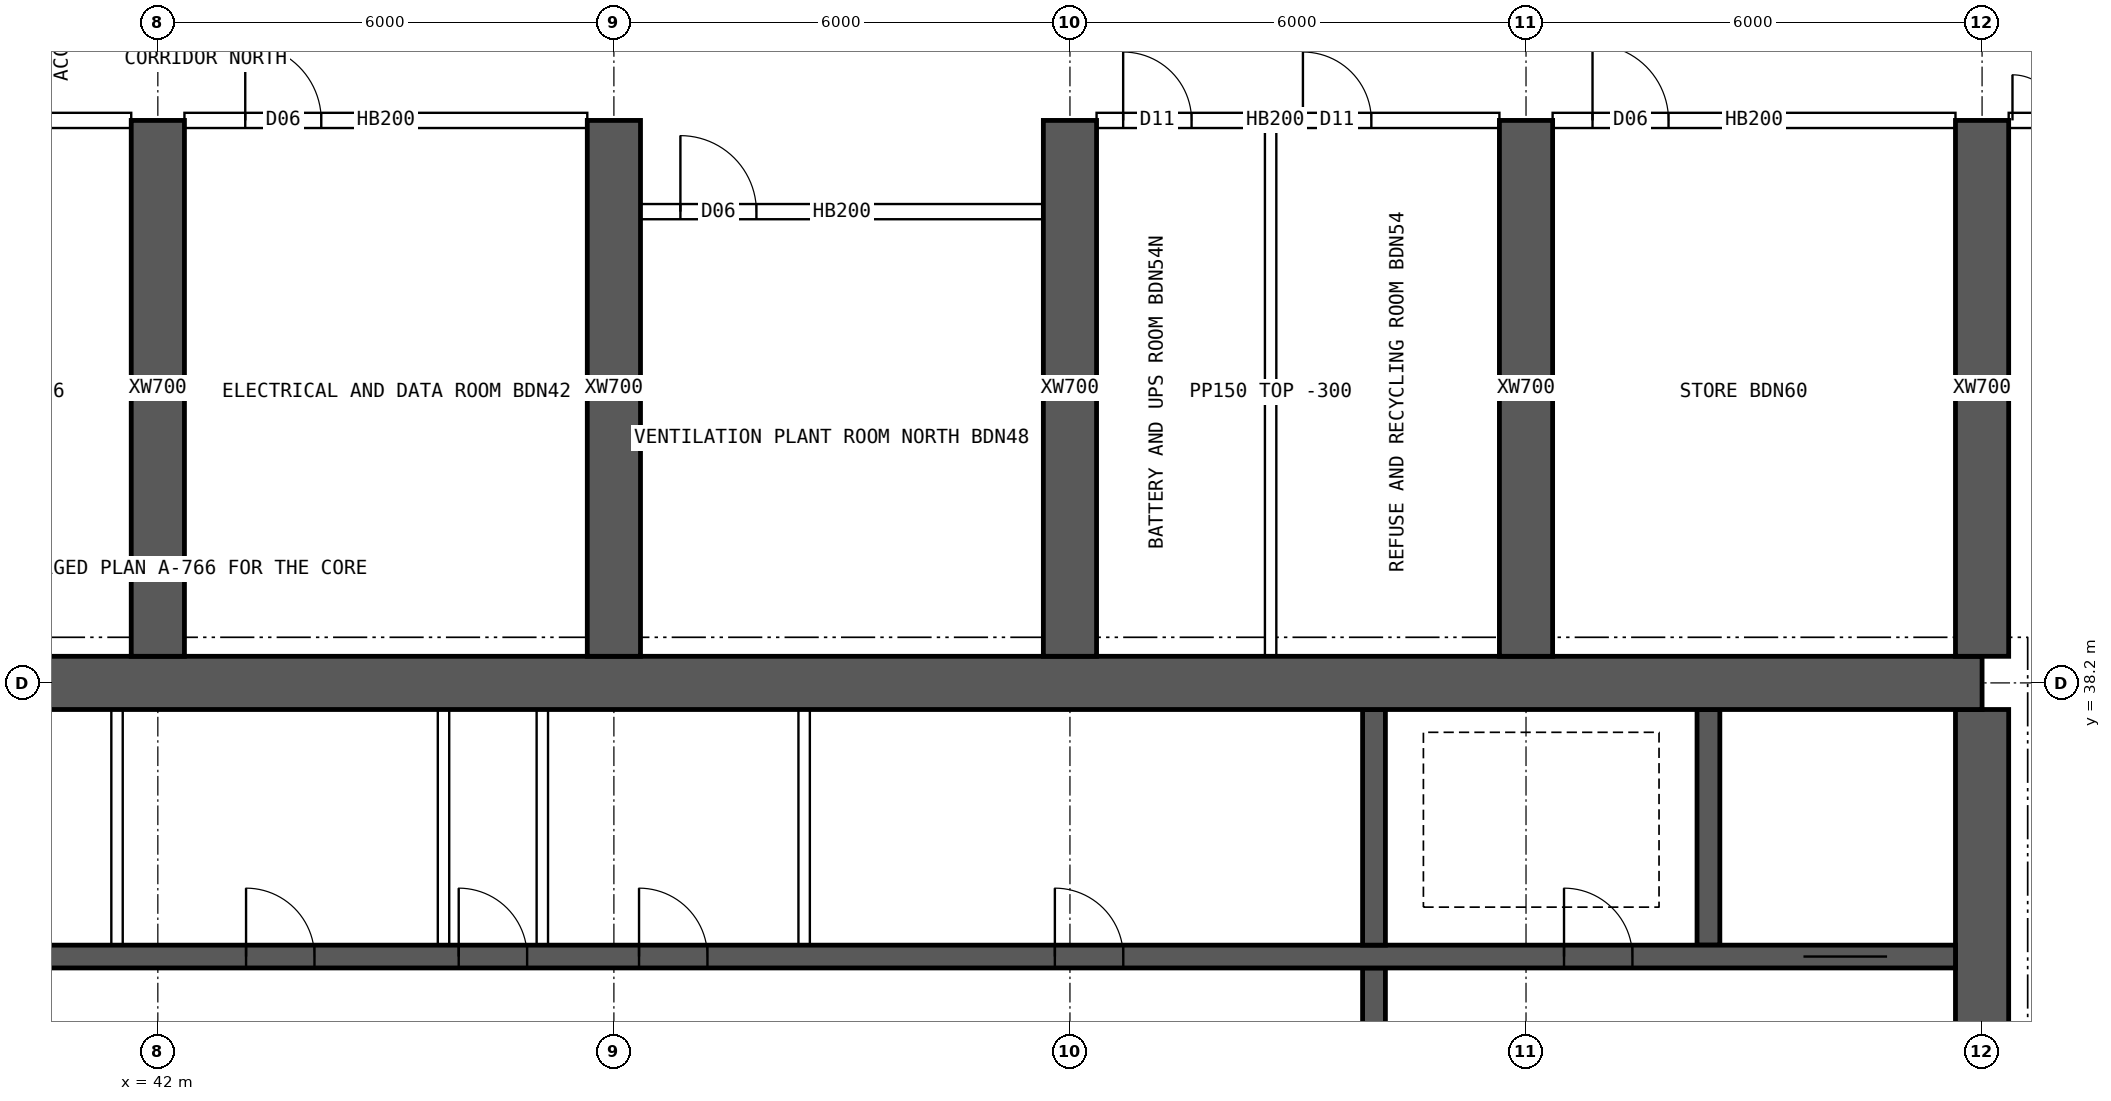
"""IFC4 building model, lengths in metres.
Left out: names, types, materials, properties, quantities, classifications, styles, units other than length and angle.
Written with IfcOpenShell. Run it as: python <this file> out.ifc"""

import sys

from ifc_helpers import new_model, si_unit, direction, frame, frame_2d, origin, place, context, subcontext, project, spatial, rectangle, extrude, element, fill, save


model = new_model("IFC4")
c1 = context("Model", 3, precision=1e-05, world=origin(), true_north=direction((0.0, 1.0)))
c2 = subcontext(c1, "Body", "Model", "MODEL_VIEW")
j1 = project(units=[si_unit("LENGTHUNIT", "METRE"), si_unit("PLANEANGLEUNIT", "RADIAN")], contexts=[c1])
p1 = place(None, origin())
s1 = spatial("IfcSite", under=j1, at=p1, CompositionType="ELEMENT")
p2 = place(p1, origin())
s2 = spatial("IfcBuilding", under=s1, at=p2, CompositionType="ELEMENT")
p3 = place(p2, frame((0.0, 0.0, 254.05)))
s3 = spatial("IfcBuildingStorey", under=s2, at=p3, CompositionType="ELEMENT", Elevation=254.05)
p4 = place(p3, frame((18.0, 38.2, 0.0), z_axis=(0.0, 0.0, 1.0), x_axis=(1.0, 0.0, 0.0)))
e1 = element("IfcWall", 1, at=p4, inside=s3, PredefinedType="SHEAR", context=c2, shape_type="SweptSolid", body=[
    extrude(rectangle(XDim=48.0, YDim=0.7, at=frame_2d((24.0, 0.0))), origin(), (0.0, 0.0, 1.0), 3.75),
])
p5 = place(p3, frame((66.0, 26.15, 0.0), z_axis=(0.0, 0.0, 1.0), x_axis=(0.0, 1.0, 0.0)))
e2 = element("IfcWall", 2, at=p5, inside=s3, PredefinedType="SHEAR", context=c2, shape_type="SweptSolid", body=[
    extrude(rectangle(XDim=11.7, YDim=0.7, at=frame_2d((5.85, 0.0))), origin(), (0.0, 0.0, 1.0), 3.75),
])
p6 = place(p5, frame((5.15, 0.0, 0.0)))
e3 = element("IfcOpeningElement", 3, at=p6, cuts=e2, PredefinedType="OPENING", context=c2, shape_type="SweptSolid", body=[
    extrude(rectangle(XDim=1.2, YDim=2.1, at=frame_2d((0.6, 1.05))), frame((0.0, 0.36, 0.0), z_axis=(0.0, -1.0, 0.0), x_axis=(1.0, 0.0, 0.0)), (0.0, 0.0, 1.0), 0.72),
])
p7 = place(p3, frame((18.35, 34.6, 0.0), z_axis=(0.0, 0.0, 1.0), x_axis=(1.0, 0.0, 0.0)))
e4 = element("IfcWall", 4, at=p7, inside=s3, PredefinedType="SHEAR", context=c2, shape_type="SweptSolid", body=[
    extrude(rectangle(XDim=47.3, YDim=0.3, at=frame_2d((23.65, 0.0))), origin(), (0.0, 0.0, 1.0), 3.75),
])
p8 = place(p7, frame((0.9, 0.0, 0.0)))
e5 = element("IfcOpeningElement", 5, at=p8, cuts=e4, PredefinedType="OPENING", context=c2, shape_type="SweptSolid", body=[
    extrude(rectangle(XDim=1.1, YDim=2.1, at=frame_2d((0.55, 1.05))), frame((0.0, 0.16, 0.0), z_axis=(0.0, -1.0, 0.0), x_axis=(1.0, 0.0, 0.0)), (0.0, 0.0, 1.0), 0.32),
])
p9 = place(p7, frame((45.3, 0.0, 0.0)))
e6 = element("IfcOpeningElement", 6, at=p9, cuts=e4, PredefinedType="OPENING", context=c2, shape_type="SweptSolid", body=[
    extrude(rectangle(XDim=1.1, YDim=2.1, at=frame_2d((0.55, 1.05))), frame((0.0, 0.16, 0.0), z_axis=(0.0, -1.0, 0.0), x_axis=(1.0, 0.0, 0.0)), (0.0, 0.0, 1.0), 0.32),
])
p10 = place(p7, frame((4.25, 0.0, 0.0)))
e7 = element("IfcOpeningElement", 7, at=p10, cuts=e4, PredefinedType="OPENING", context=c2, shape_type="SweptSolid", body=[
    extrude(rectangle(XDim=0.9, YDim=2.1, at=frame_2d((0.45, 1.05))), frame((0.0, 0.16, 0.0), z_axis=(0.0, -1.0, 0.0), x_axis=(1.0, 0.0, 0.0)), (0.0, 0.0, 1.0), 0.32),
])
p11 = place(p7, frame((42.15, 0.0, 0.0)))
e8 = element("IfcOpeningElement", 8, at=p11, cuts=e4, PredefinedType="OPENING", context=c2, shape_type="SweptSolid", body=[
    extrude(rectangle(XDim=0.9, YDim=2.1, at=frame_2d((0.45, 1.05))), frame((0.0, 0.16, 0.0), z_axis=(0.0, -1.0, 0.0), x_axis=(1.0, 0.0, 0.0)), (0.0, 0.0, 1.0), 0.32),
])
p12 = place(p7, frame((9.025, 0.0, 0.0)))
e9 = element("IfcOpeningElement", 9, at=p12, cuts=e4, PredefinedType="OPENING", context=c2, shape_type="SweptSolid", body=[
    extrude(rectangle(XDim=0.9, YDim=2.1, at=frame_2d((0.45, 1.05))), frame((0.0, 0.16, 0.0), z_axis=(0.0, -1.0, 0.0), x_axis=(1.0, 0.0, 0.0)), (0.0, 0.0, 1.0), 0.32),
])
p13 = place(p7, frame((12.999, 0.0, 0.0)))
e10 = element("IfcOpeningElement", 10, at=p13, cuts=e4, PredefinedType="OPENING", context=c2, shape_type="SweptSolid", body=[
    extrude(rectangle(XDim=0.9, YDim=2.1, at=frame_2d((0.45, 1.05))), frame((0.0, 0.16, 0.0), z_axis=(0.0, -1.0, 0.0), x_axis=(1.0, 0.0, 0.0)), (0.0, 0.0, 1.0), 0.32),
])
p14 = place(p7, frame((16.646, 0.0, 0.0)))
e11 = element("IfcOpeningElement", 11, at=p14, cuts=e4, PredefinedType="OPENING", context=c2, shape_type="SweptSolid", body=[
    extrude(rectangle(XDim=0.9, YDim=2.1, at=frame_2d((0.45, 1.05))), frame((0.0, 0.16, 0.0), z_axis=(0.0, -1.0, 0.0), x_axis=(1.0, 0.0, 0.0)), (0.0, 0.0, 1.0), 0.32),
])
p15 = place(p7, frame((20.405, 0.0, 0.0)))
e12 = element("IfcOpeningElement", 12, at=p15, cuts=e4, PredefinedType="OPENING", context=c2, shape_type="SweptSolid", body=[
    extrude(rectangle(XDim=0.9, YDim=2.1, at=frame_2d((0.45, 1.05))), frame((0.0, 0.16, 0.0), z_axis=(0.0, -1.0, 0.0), x_axis=(1.0, 0.0, 0.0)), (0.0, 0.0, 1.0), 0.32),
])
p16 = place(p7, frame((24.811, 0.0, 0.0)))
e13 = element("IfcOpeningElement", 13, at=p16, cuts=e4, PredefinedType="OPENING", context=c2, shape_type="SweptSolid", body=[
    extrude(rectangle(XDim=0.9, YDim=2.1, at=frame_2d((0.45, 1.05))), frame((0.0, 0.16, 0.0), z_axis=(0.0, -1.0, 0.0), x_axis=(1.0, 0.0, 0.0)), (0.0, 0.0, 1.0), 0.32),
])
p17 = place(p7, frame((27.608, 0.0, 0.0)))
e14 = element("IfcOpeningElement", 14, at=p17, cuts=e4, PredefinedType="OPENING", context=c2, shape_type="SweptSolid", body=[
    extrude(rectangle(XDim=0.9, YDim=2.1, at=frame_2d((0.45, 1.05))), frame((0.0, 0.16, 0.0), z_axis=(0.0, -1.0, 0.0), x_axis=(1.0, 0.0, 0.0)), (0.0, 0.0, 1.0), 0.32),
])
p18 = place(p7, frame((29.981, 0.0, 0.0)))
e15 = element("IfcOpeningElement", 15, at=p18, cuts=e4, PredefinedType="OPENING", context=c2, shape_type="SweptSolid", body=[
    extrude(rectangle(XDim=0.9, YDim=2.1, at=frame_2d((0.45, 1.05))), frame((0.0, 0.16, 0.0), z_axis=(0.0, -1.0, 0.0), x_axis=(1.0, 0.0, 0.0)), (0.0, 0.0, 1.0), 0.32),
])
p19 = place(p7, frame((35.451, 0.0, 0.0)))
e16 = element("IfcOpeningElement", 16, at=p19, cuts=e4, PredefinedType="OPENING", context=c2, shape_type="SweptSolid", body=[
    extrude(rectangle(XDim=0.9, YDim=2.1, at=frame_2d((0.45, 1.05))), frame((0.0, 0.16, 0.0), z_axis=(0.0, -1.0, 0.0), x_axis=(1.0, 0.0, 0.0)), (0.0, 0.0, 1.0), 0.32),
])
p20 = place(p3, frame((58.0, 30.55, 0.0), z_axis=(0.0, 0.0, 1.0), x_axis=(0.0, 1.0, 0.0)))
e17 = element("IfcWall", 17, at=p20, inside=s3, PredefinedType="SHEAR", context=c2, shape_type="SweptSolid", body=[
    extrude(rectangle(XDim=3.9, YDim=0.3, at=frame_2d((1.95, 0.0))), origin(), (0.0, 0.0, 1.0), 3.75),
])
p21 = place(p20, frame((1.4, 0.0, 0.0)))
e18 = element("IfcOpeningElement", 18, at=p21, cuts=e17, PredefinedType="OPENING", context=c2, shape_type="SweptSolid", body=[
    extrude(rectangle(XDim=1.2, YDim=2.1, at=frame_2d((0.6, 1.05))), frame((0.0, 0.16, 0.0), z_axis=(0.0, -1.0, 0.0), x_axis=(1.0, 0.0, 0.0)), (0.0, 0.0, 1.0), 0.32),
])
for number, where, z_axis, x_axis in (
    (19, (62.4, 34.75, 0.0), (0.0, 0.0, 1.0), (0.0, 1.0, 0.0)),
    (20, (58.0, 34.75, 0.0), (0.0, 0.0, 1.0), (0.0, 1.0, 0.0)),
):
    element("IfcWall", number, at=place(p3, frame(where, z_axis=z_axis, x_axis=x_axis)), inside=s3, PredefinedType="SHEAR", context=c2, shape_type="SweptSolid", body=[
        extrude(rectangle(XDim=3.1, YDim=0.3, at=frame_2d((1.55, 0.0))), origin(), (0.0, 0.0, 1.0), 3.75),
    ])
for number, where, z_axis, x_axis in (
    (21, (42.0, 38.55, 0.0), (0.0, 0.0, 1.0), (0.0, 1.0, 0.0)),
    (22, (48.0, 38.55, 0.0), (0.0, 0.0, 1.0), (0.0, 1.0, 0.0)),
    (23, (54.0, 38.55, 0.0), (0.0, 0.0, 1.0), (0.0, 1.0, 0.0)),
    (24, (60.0, 38.55, 0.0), (0.0, 0.0, 1.0), (0.0, 1.0, 0.0)),
    (25, (66.0, 38.55, 0.0), (0.0, 0.0, 1.0), (0.0, 1.0, 0.0)),
):
    element("IfcWall", number, at=place(p3, frame(where, z_axis=z_axis, x_axis=x_axis)), inside=s3, PredefinedType="SHEAR", context=c2, shape_type="SweptSolid", body=[
        extrude(rectangle(XDim=7.05, YDim=0.7, at=frame_2d((3.525, 0.0))), origin(), (0.0, 0.0, 1.0), 3.75),
    ])
for number, where, z_axis, x_axis in (
    (26, (41.463, 34.75, 0.0), (0.0, 0.0, 1.0), (0.0, 1.0, 0.0)),
    (27, (45.758, 34.75, 0.0), (0.0, 0.0, 1.0), (0.0, 1.0, 0.0)),
    (28, (47.058, 34.75, 0.0), (0.0, 0.0, 1.0), (0.0, 1.0, 0.0)),
    (29, (50.503, 34.75, 0.0), (0.0, 0.0, 1.0), (0.0, 1.0, 0.0)),
):
    element("IfcWall", number, at=place(p3, frame(where, z_axis=z_axis, x_axis=x_axis)), inside=s3, PredefinedType="SOLIDWALL", context=c2, shape_type="SweptSolid", body=[
        extrude(rectangle(XDim=3.1, YDim=0.15, at=frame_2d((1.55, 0.0))), origin(), (0.0, 0.0, 1.0), 3.45),
    ])
p22 = place(p3, frame((36.35, 45.6, 0.0), z_axis=(0.0, 0.0, 1.0), x_axis=(1.0, 0.0, 0.0)))
e30 = element("IfcWall", 30, at=p22, inside=s3, PredefinedType="SOLIDWALL", context=c2, shape_type="SweptSolid", body=[
    extrude(rectangle(XDim=5.3, YDim=0.2, at=frame_2d((2.65, 0.0))), origin(), (0.0, 0.0, 1.0), 3.45),
])
p23 = place(p22, frame((0.525, 0.0, 0.0)))
e31 = element("IfcOpeningElement", 31, at=p23, cuts=e30, PredefinedType="OPENING", context=c2, shape_type="SweptSolid", body=[
    extrude(rectangle(XDim=1.0, YDim=2.1, at=frame_2d((0.5, 1.05))), frame((0.0, 0.11, 0.0), z_axis=(0.0, -1.0, 0.0), x_axis=(1.0, 0.0, 0.0)), (0.0, 0.0, 1.0), 0.22),
])
p24 = place(p3, frame((42.35, 45.6, 0.0), z_axis=(0.0, 0.0, 1.0), x_axis=(1.0, 0.0, 0.0)))
e32 = element("IfcWall", 32, at=p24, inside=s3, PredefinedType="SOLIDWALL", context=c2, shape_type="SweptSolid", body=[
    extrude(rectangle(XDim=5.3, YDim=0.2, at=frame_2d((2.65, 0.0))), origin(), (0.0, 0.0, 1.0), 3.45),
])
p25 = place(p24, frame((0.8, 0.0, 0.0)))
e33 = element("IfcOpeningElement", 33, at=p25, cuts=e32, PredefinedType="OPENING", context=c2, shape_type="SweptSolid", body=[
    extrude(rectangle(XDim=1.0, YDim=2.1, at=frame_2d((0.5, 1.05))), frame((0.0, 0.11, 0.0), z_axis=(0.0, -1.0, 0.0), x_axis=(1.0, 0.0, 0.0)), (0.0, 0.0, 1.0), 0.22),
])
p26 = place(p3, frame((54.35, 45.6, 0.0), z_axis=(0.0, 0.0, 1.0), x_axis=(1.0, 0.0, 0.0)))
e34 = element("IfcWall", 34, at=p26, inside=s3, PredefinedType="SOLIDWALL", context=c2, shape_type="SweptSolid", body=[
    extrude(rectangle(XDim=5.3, YDim=0.2, at=frame_2d((2.65, 0.0))), origin(), (0.0, 0.0, 1.0), 3.45),
])
p27 = place(p26, frame((0.35, 0.0, 0.0)))
e35 = element("IfcOpeningElement", 35, at=p27, cuts=e34, PredefinedType="OPENING", context=c2, shape_type="SweptSolid", body=[
    extrude(rectangle(XDim=0.9, YDim=2.1, at=frame_2d((0.45, 1.05))), frame((0.0, 0.11, 0.0), z_axis=(0.0, -1.0, 0.0), x_axis=(1.0, 0.0, 0.0)), (0.0, 0.0, 1.0), 0.22),
])
p28 = place(p26, frame((2.715, 0.0, 0.0)))
e36 = element("IfcOpeningElement", 36, at=p28, cuts=e34, PredefinedType="OPENING", context=c2, shape_type="SweptSolid", body=[
    extrude(rectangle(XDim=0.9, YDim=2.1, at=frame_2d((0.45, 1.05))), frame((0.0, 0.11, 0.0), z_axis=(0.0, -1.0, 0.0), x_axis=(1.0, 0.0, 0.0)), (0.0, 0.0, 1.0), 0.22),
])
p29 = place(p3, frame((60.35, 45.6, 0.0), z_axis=(0.0, 0.0, 1.0), x_axis=(1.0, 0.0, 0.0)))
e37 = element("IfcWall", 37, at=p29, inside=s3, PredefinedType="SOLIDWALL", context=c2, shape_type="SweptSolid", body=[
    extrude(rectangle(XDim=5.3, YDim=0.2, at=frame_2d((2.65, 0.0))), origin(), (0.0, 0.0, 1.0), 3.45),
])
p30 = place(p29, frame((0.525, 0.0, 0.0)))
e38 = element("IfcOpeningElement", 38, at=p30, cuts=e37, PredefinedType="OPENING", context=c2, shape_type="SweptSolid", body=[
    extrude(rectangle(XDim=1.0, YDim=2.1, at=frame_2d((0.5, 1.05))), frame((0.0, 0.11, 0.0), z_axis=(0.0, -1.0, 0.0), x_axis=(1.0, 0.0, 0.0)), (0.0, 0.0, 1.0), 0.22),
])
p31 = place(p3, frame((66.35, 45.6, 0.0), z_axis=(0.0, 0.0, 1.0), x_axis=(1.0, 0.0, 0.0)))
e39 = element("IfcWall", 39, at=p31, inside=s3, PredefinedType="SOLIDWALL", context=c2, shape_type="SweptSolid", body=[
    extrude(rectangle(XDim=2.05, YDim=0.2, at=frame_2d((1.025, 0.0))), origin(), (0.0, 0.0, 1.0), 3.45),
])
p32 = place(p31, frame((0.05, 0.0, 0.0)))
e40 = element("IfcOpeningElement", 40, at=p32, cuts=e39, PredefinedType="OPENING", context=c2, shape_type="SweptSolid", body=[
    extrude(rectangle(XDim=1.2, YDim=2.1, at=frame_2d((0.6, 1.05))), frame((0.0, 0.11, 0.0), z_axis=(0.0, -1.0, 0.0), x_axis=(1.0, 0.0, 0.0)), (0.0, 0.0, 1.0), 0.22),
])
p33 = place(p3, frame((48.35, 44.4, 0.0), z_axis=(0.0, 0.0, 1.0), x_axis=(1.0, 0.0, 0.0)))
e41 = element("IfcWall", 41, at=p33, inside=s3, PredefinedType="SOLIDWALL", context=c2, shape_type="SweptSolid", body=[
    extrude(rectangle(XDim=5.3, YDim=0.2, at=frame_2d((2.65, 0.0))), origin(), (0.0, 0.0, 1.0), 3.45),
])
p34 = place(p33, frame((0.525, 0.0, 0.0)))
e42 = element("IfcOpeningElement", 42, at=p34, cuts=e41, PredefinedType="OPENING", context=c2, shape_type="SweptSolid", body=[
    extrude(rectangle(XDim=1.0, YDim=2.1, at=frame_2d((0.5, 1.05))), frame((0.0, 0.11, 0.0), z_axis=(0.0, -1.0, 0.0), x_axis=(1.0, 0.0, 0.0)), (0.0, 0.0, 1.0), 0.22),
])
p35 = place(p3, frame((56.64, 38.55, 0.0), z_axis=(0.0, 0.0, 1.0), x_axis=(0.0, 1.0, 0.0)))
e43 = element("IfcWall", 43, at=p35, inside=s3, PredefinedType="PARTITIONING", context=c2, shape_type="SweptSolid", body=[
    extrude(rectangle(XDim=6.95, YDim=0.15, at=frame_2d((3.475, 0.0))), origin(), (0.0, 0.0, 1.0), 3.45),
])
p36 = place(p9, origin())
e44 = element("IfcDoor", 44, at=p36, inside=s3, OperationType="DOUBLE_DOOR_SLIDING", PredefinedType="DOOR", context=c2, shape_type="SweptSolid", body=[
    extrude(rectangle(XDim=1.1, YDim=2.1, at=frame_2d((0.55, 1.05))), frame((0.0, 0.025, 0.0), z_axis=(0.0, -1.0, 0.0), x_axis=(1.0, 0.0, 0.0)), (0.0, 0.0, 1.0), 0.05),
])
fill(e6, e44)
p37 = place(p11, origin())
e45 = element("IfcDoor", 45, at=p37, inside=s3, OperationType="SINGLE_SWING_LEFT", PredefinedType="DOOR", context=c2, shape_type="SweptSolid", body=[
    extrude(rectangle(XDim=0.9, YDim=2.1, at=frame_2d((0.45, 1.05))), frame((0.0, 0.025, 0.0), z_axis=(0.0, -1.0, 0.0), x_axis=(1.0, 0.0, 0.0)), (0.0, 0.0, 1.0), 0.05),
])
fill(e8, e45)
p38 = place(p16, origin())
e46 = element("IfcDoor", 46, at=p38, inside=s3, OperationType="SINGLE_SWING_LEFT", PredefinedType="DOOR", context=c2, shape_type="SweptSolid", body=[
    extrude(rectangle(XDim=0.9, YDim=2.1, at=frame_2d((0.45, 1.05))), frame((0.0, 0.025, 0.0), z_axis=(0.0, -1.0, 0.0), x_axis=(1.0, 0.0, 0.0)), (0.0, 0.0, 1.0), 0.05),
])
fill(e13, e46)
p39 = place(p17, origin())
e47 = element("IfcDoor", 47, at=p39, inside=s3, OperationType="SINGLE_SWING_LEFT", PredefinedType="DOOR", context=c2, shape_type="SweptSolid", body=[
    extrude(rectangle(XDim=0.9, YDim=2.1, at=frame_2d((0.45, 1.05))), frame((0.0, 0.025, 0.0), z_axis=(0.0, -1.0, 0.0), x_axis=(1.0, 0.0, 0.0)), (0.0, 0.0, 1.0), 0.05),
])
fill(e14, e47)
p40 = place(p18, origin())
e48 = element("IfcDoor", 48, at=p40, inside=s3, OperationType="SINGLE_SWING_LEFT", PredefinedType="DOOR", context=c2, shape_type="SweptSolid", body=[
    extrude(rectangle(XDim=0.9, YDim=2.1, at=frame_2d((0.45, 1.05))), frame((0.0, 0.025, 0.0), z_axis=(0.0, -1.0, 0.0), x_axis=(1.0, 0.0, 0.0)), (0.0, 0.0, 1.0), 0.05),
])
fill(e15, e48)
p41 = place(p19, origin())
e49 = element("IfcDoor", 49, at=p41, inside=s3, OperationType="SINGLE_SWING_LEFT", PredefinedType="DOOR", context=c2, shape_type="SweptSolid", body=[
    extrude(rectangle(XDim=0.9, YDim=2.1, at=frame_2d((0.45, 1.05))), frame((0.0, 0.025, 0.0), z_axis=(0.0, -1.0, 0.0), x_axis=(1.0, 0.0, 0.0)), (0.0, 0.0, 1.0), 0.05),
])
fill(e16, e49)
p42 = place(p32, origin())
e50 = element("IfcDoor", 50, at=p42, inside=s3, OperationType="DOUBLE_DOOR_SINGLE_SWING", PredefinedType="DOOR", context=c2, shape_type="SweptSolid", body=[
    extrude(rectangle(XDim=1.2, YDim=2.1, at=frame_2d((0.6, 1.05))), frame((0.0, 0.025, 0.0), z_axis=(0.0, -1.0, 0.0), x_axis=(1.0, 0.0, 0.0)), (0.0, 0.0, 1.0), 0.05),
])
fill(e40, e50)
p43 = place(p25, origin())
e51 = element("IfcDoor", 51, at=p43, inside=s3, OperationType="SINGLE_SWING_LEFT", PredefinedType="DOOR", context=c2, shape_type="SweptSolid", body=[
    extrude(rectangle(XDim=1.0, YDim=2.1, at=frame_2d((0.5, 1.05))), frame((0.0, 0.025, 0.0), z_axis=(0.0, -1.0, 0.0), x_axis=(1.0, 0.0, 0.0)), (0.0, 0.0, 1.0), 0.05),
])
fill(e33, e51)
p44 = place(p34, origin())
e52 = element("IfcDoor", 52, at=p44, inside=s3, OperationType="SINGLE_SWING_LEFT", PredefinedType="DOOR", context=c2, shape_type="SweptSolid", body=[
    extrude(rectangle(XDim=1.0, YDim=2.1, at=frame_2d((0.5, 1.05))), frame((0.0, 0.025, 0.0), z_axis=(0.0, -1.0, 0.0), x_axis=(1.0, 0.0, 0.0)), (0.0, 0.0, 1.0), 0.05),
])
fill(e42, e52)
p45 = place(p27, origin())
e53 = element("IfcDoor", 53, at=p45, inside=s3, OperationType="SINGLE_SWING_LEFT", PredefinedType="DOOR", context=c2, shape_type="SweptSolid", body=[
    extrude(rectangle(XDim=0.9, YDim=2.1, at=frame_2d((0.45, 1.05))), frame((0.0, 0.025, 0.0), z_axis=(0.0, -1.0, 0.0), x_axis=(1.0, 0.0, 0.0)), (0.0, 0.0, 1.0), 0.05),
])
fill(e35, e53)
p46 = place(p28, origin())
e54 = element("IfcDoor", 54, at=p46, inside=s3, OperationType="SINGLE_SWING_LEFT", PredefinedType="DOOR", context=c2, shape_type="SweptSolid", body=[
    extrude(rectangle(XDim=0.9, YDim=2.1, at=frame_2d((0.45, 1.05))), frame((0.0, 0.025, 0.0), z_axis=(0.0, -1.0, 0.0), x_axis=(1.0, 0.0, 0.0)), (0.0, 0.0, 1.0), 0.05),
])
fill(e36, e54)
p47 = place(p30, origin())
e55 = element("IfcDoor", 55, at=p47, inside=s3, OperationType="SINGLE_SWING_LEFT", PredefinedType="DOOR", context=c2, shape_type="SweptSolid", body=[
    extrude(rectangle(XDim=1.0, YDim=2.1, at=frame_2d((0.5, 1.05))), frame((0.0, 0.025, 0.0), z_axis=(0.0, -1.0, 0.0), x_axis=(1.0, 0.0, 0.0)), (0.0, 0.0, 1.0), 0.05),
])
fill(e38, e55)
save(model, sys.argv[1])
